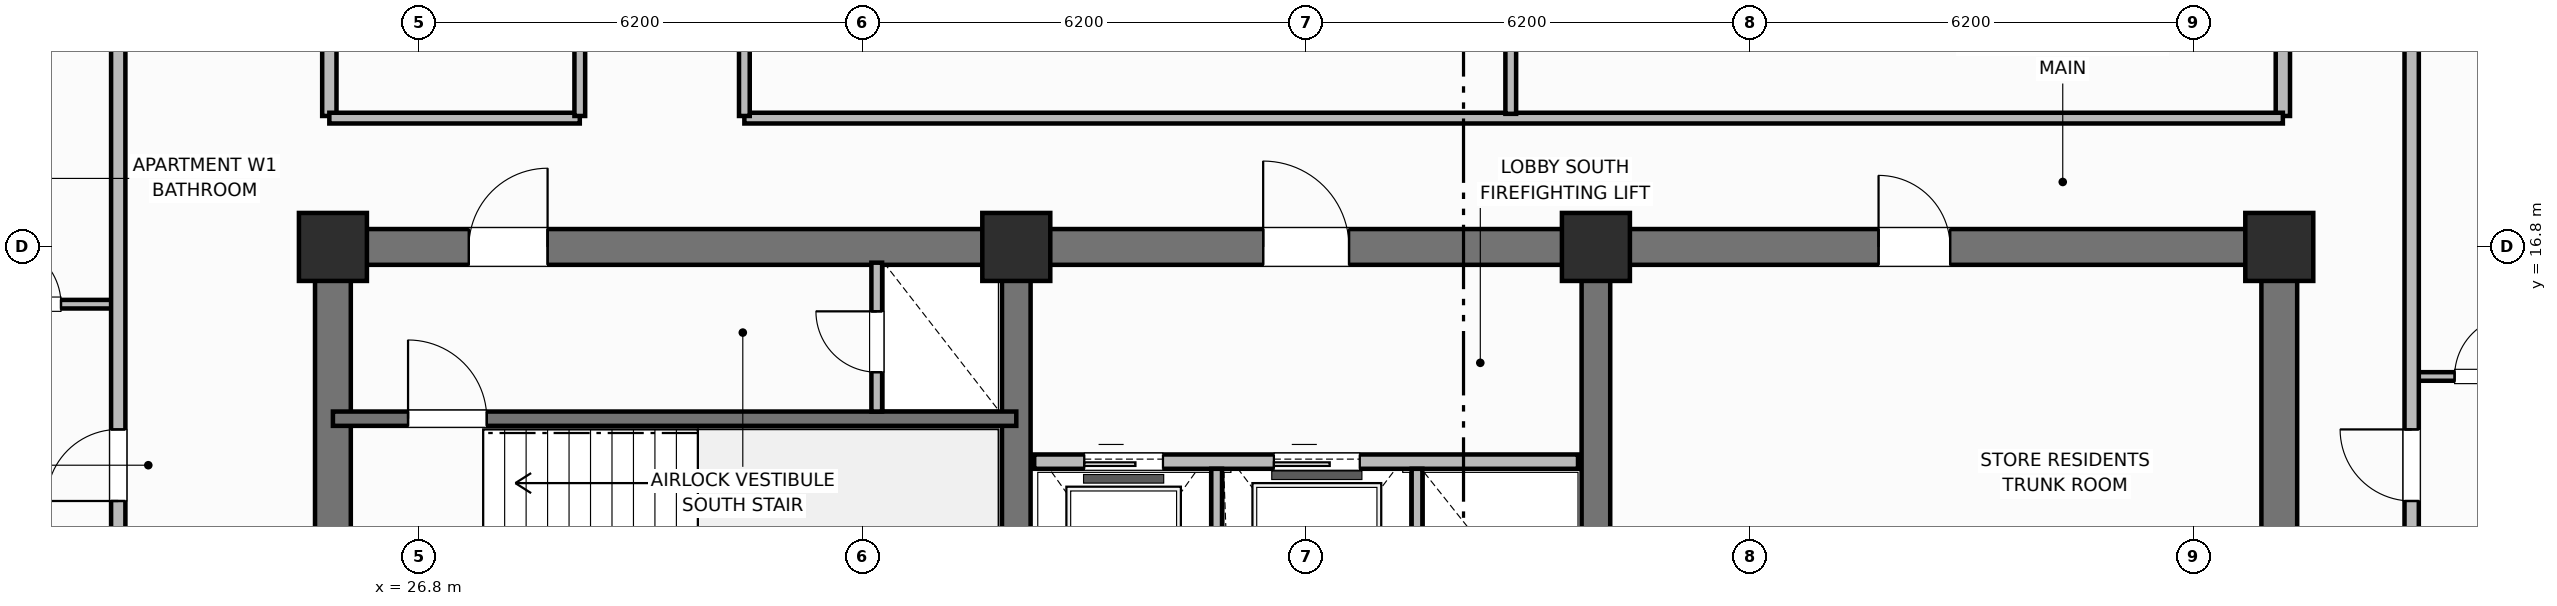
"""IFC4 building model, lengths in metres.
Left out: names, types, materials, properties, quantities, classifications, styles, units other than length and angle.
Written with IfcOpenShell. Run it as: python <this file> out.ifc"""

import sys

from ifc_helpers import new_model, si_unit, direction, frame, frame_2d, origin, origin_2d, place, context, subcontext, project, spatial, rectangle, extrude, element, fill, save


model = new_model("IFC4")
c1 = context("Model", 3, precision=1e-05, world=origin(), true_north=direction((0.0, 1.0)))
c2 = subcontext(c1, "Body", "Model", "MODEL_VIEW")
j1 = project(units=[si_unit("LENGTHUNIT", "METRE"), si_unit("PLANEANGLEUNIT", "RADIAN")], contexts=[c1])
p1 = place(None, origin())
s1 = spatial("IfcSite", under=j1, at=p1, CompositionType="ELEMENT")
p2 = place(p1, origin())
s2 = spatial("IfcBuilding", under=s1, at=p2, CompositionType="ELEMENT")
p3 = place(p2, frame((0.0, 0.0, 184.8)))
s3 = spatial("IfcBuildingStorey", under=s2, at=p3, CompositionType="ELEMENT", Elevation=184.8)
for number, where, z_axis, x_axis in (
    (1, (25.6, 10.85, 0.0), (0.0, 0.0, 1.0), (0.0, 1.0, 0.0)),
    (2, (52.8, 10.85, 0.0), (0.0, 0.0, 1.0), (0.0, 1.0, 0.0)),
):
    element("IfcWall", number, at=place(p3, frame(where, z_axis=z_axis, x_axis=x_axis)), inside=s3, PredefinedType="SHEAR", context=c2, shape_type="SweptSolid", body=[
        extrude(rectangle(XDim=5.7, YDim=0.5, at=frame_2d((2.85, 0.0))), origin(), (0.0, 0.0, 1.0), 3.7),
    ])
p4 = place(p3, frame((25.6, 16.8, 0.0), z_axis=(0.0, 0.0, 1.0), x_axis=(1.0, 0.0, 0.0)))
e3 = element("IfcWall", 3, at=p4, inside=s3, PredefinedType="SHEAR", context=c2, shape_type="SweptSolid", body=[
    extrude(rectangle(XDim=27.2, YDim=0.5, at=frame_2d((13.6, 0.0))), origin(), (0.0, 0.0, 1.0), 3.7),
])
p5 = place(p4, frame((1.9, 0.0, 0.0)))
e4 = element("IfcOpeningElement", 4, at=p5, cuts=e3, PredefinedType="OPENING", context=c2, shape_type="SweptSolid", body=[
    extrude(rectangle(XDim=1.1, YDim=2.15, at=frame_2d((0.55, 1.075))), frame((0.0, 0.26, 0.0), z_axis=(0.0, -1.0, 0.0), x_axis=(1.0, 0.0, 0.0)), (0.0, 0.0, 1.0), 0.52),
])
p6 = place(p4, frame((13.0, 0.0, 0.0)))
e5 = element("IfcOpeningElement", 5, at=p6, cuts=e3, PredefinedType="OPENING", context=c2, shape_type="SweptSolid", body=[
    extrude(rectangle(XDim=1.2, YDim=2.15, at=frame_2d((0.6, 1.075))), frame((0.0, 0.26, 0.0), z_axis=(0.0, -1.0, 0.0), x_axis=(1.0, 0.0, 0.0)), (0.0, 0.0, 1.0), 0.52),
])
p7 = place(p4, frame((21.6, 0.0, 0.0)))
e6 = element("IfcOpeningElement", 6, at=p7, cuts=e3, PredefinedType="OPENING", context=c2, shape_type="SweptSolid", body=[
    extrude(rectangle(XDim=1.0, YDim=2.15, at=frame_2d((0.5, 1.075))), frame((0.0, 0.26, 0.0), z_axis=(0.0, -1.0, 0.0), x_axis=(1.0, 0.0, 0.0)), (0.0, 0.0, 1.0), 0.52),
])
for number, where, z_axis, x_axis in (
    (7, (35.15, 10.85, 0.0), (0.0, 0.0, 1.0), (0.0, 1.0, 0.0)),
    (8, (43.25, 10.85, 0.0), (0.0, 0.0, 1.0), (0.0, 1.0, 0.0)),
):
    element("IfcWall", number, at=place(p3, frame(where, z_axis=z_axis, x_axis=x_axis)), inside=s3, PredefinedType="SHEAR", context=c2, shape_type="SweptSolid", body=[
        extrude(rectangle(XDim=5.7, YDim=0.4, at=frame_2d((2.85, 0.0))), origin(), (0.0, 0.0, 1.0), 3.7),
    ])
for number, where, z_axis, x_axis in (
    (9, (25.6, 16.8, 0.0), (0.0, 0.0, 1.0), (1.0, 0.0, 0.0)),
    (10, (35.15, 16.8, 0.0), (0.0, 0.0, 1.0), (1.0, 0.0, 0.0)),
    (11, (43.25, 16.8, 0.0), (0.0, 0.0, 1.0), (1.0, 0.0, 0.0)),
    (12, (52.8, 16.8, 0.0), (0.0, 0.0, 1.0), (1.0, 0.0, 0.0)),
):
    element("IfcColumn", number, at=place(p3, frame(where, z_axis=z_axis, x_axis=x_axis)), inside=s3, PredefinedType="COLUMN", context=c2, shape_type="SweptSolid", body=[
        extrude(rectangle(XDim=0.95, YDim=0.95, at=origin_2d()), origin(), (0.0, 0.0, 1.0), 3.7),
    ])
p8 = place(p3, frame((25.6, 14.4, 0.0), z_axis=(0.0, 0.0, 1.0), x_axis=(1.0, 0.0, 0.0)))
e13 = element("IfcWall", 13, at=p8, inside=s3, PredefinedType="SHEAR", context=c2, shape_type="SweptSolid", body=[
    extrude(rectangle(XDim=9.55, YDim=0.2, at=frame_2d((4.775, 0.0))), origin(), (0.0, 0.0, 1.0), 3.7),
])
p9 = place(p8, frame((1.05, 0.0, 0.0)))
e14 = element("IfcOpeningElement", 14, at=p9, cuts=e13, PredefinedType="OPENING", context=c2, shape_type="SweptSolid", body=[
    extrude(rectangle(XDim=1.1, YDim=2.15, at=frame_2d((0.55, 1.075))), frame((0.0, 0.11, 0.0), z_axis=(0.0, -1.0, 0.0), x_axis=(1.0, 0.0, 0.0)), (0.0, 0.0, 1.0), 0.22),
])
p10 = place(p3, frame((33.2, 14.5, 0.0), z_axis=(0.0, 0.0, 1.0), x_axis=(0.0, 1.0, 0.0)))
e15 = element("IfcWall", 15, at=p10, inside=s3, PredefinedType="PARTITIONING", context=c2, shape_type="SweptSolid", body=[
    extrude(rectangle(XDim=2.08, YDim=0.15, at=frame_2d((1.04, 0.0))), origin(), (0.0, 0.0, 1.0), 2.55),
])
p11 = place(p10, frame((0.55, 0.0, 0.0)))
e16 = element("IfcOpeningElement", 16, at=p11, cuts=e15, PredefinedType="OPENING", context=c2, shape_type="SweptSolid", body=[
    extrude(rectangle(XDim=0.85, YDim=2.05, at=frame_2d((0.425, 1.025))), frame((0.0, 0.085, 0.0), z_axis=(0.0, -1.0, 0.0), x_axis=(1.0, 0.0, 0.0)), (0.0, 0.0, 1.0), 0.17),
])
p12 = place(p3, frame((35.4, 13.8, 0.0), z_axis=(0.0, 0.0, 1.0), x_axis=(1.0, 0.0, 0.0)))
e17 = element("IfcWall", 17, at=p12, inside=s3, PredefinedType="PARTITIONING", context=c2, shape_type="SweptSolid", body=[
    extrude(rectangle(XDim=7.6, YDim=0.2, at=frame_2d((3.8, 0.0))), origin(), (0.0, 0.0, 1.0), 2.32),
])
p13 = place(p12, frame((0.7, 0.0, 0.0)))
e18 = element("IfcOpeningElement", 18, at=p13, cuts=e17, PredefinedType="OPENING", context=c2, shape_type="SweptSolid", body=[
    extrude(rectangle(XDim=1.1, YDim=2.15, at=frame_2d((0.55, 1.075))), frame((0.0, 0.11, 0.0), z_axis=(0.0, -1.0, 0.0), x_axis=(1.0, 0.0, 0.0)), (0.0, 0.0, 1.0), 0.22),
])
p14 = place(p12, frame((3.35, 0.0, 0.0)))
e19 = element("IfcOpeningElement", 19, at=p14, cuts=e17, PredefinedType="OPENING", context=c2, shape_type="SweptSolid", body=[
    extrude(rectangle(XDim=1.2, YDim=2.15, at=frame_2d((0.6, 1.075))), frame((0.0, 0.11, 0.0), z_axis=(0.0, -1.0, 0.0), x_axis=(1.0, 0.0, 0.0)), (0.0, 0.0, 1.0), 0.22),
])
for number, where, z_axis, x_axis in (
    (20, (37.95, 10.95, 0.0), (0.0, 0.0, 1.0), (0.0, 1.0, 0.0)),
    (21, (40.75, 10.95, 0.0), (0.0, 0.0, 1.0), (0.0, 1.0, 0.0)),
):
    element("IfcWall", number, at=place(p3, frame(where, z_axis=z_axis, x_axis=x_axis)), inside=s3, PredefinedType="PARTITIONING", context=c2, shape_type="SweptSolid", body=[
        extrude(rectangle(XDim=2.75, YDim=0.15, at=frame_2d((1.375, 0.0))), origin(), (0.0, 0.0, 1.0), 2.55),
    ])
for number, where, z_axis, x_axis in (
    (22, (25.55, 18.63, 0.0), (0.0, 0.0, 1.0), (0.0, 1.0, 0.0)),
    (23, (52.85, 18.63, 0.0), (0.0, 0.0, 1.0), (0.0, 1.0, 0.0)),
):
    element("IfcWall", number, at=place(p3, frame(where, z_axis=z_axis, x_axis=x_axis)), inside=s3, PredefinedType="PARTITIONING", context=c2, shape_type="SweptSolid", body=[
        extrude(rectangle(XDim=19.14, YDim=0.2, at=frame_2d((9.57, 0.0))), origin(), (0.0, 0.0, 1.0), 2.55),
    ])
p15 = place(p3, frame((25.55, 18.6, 0.0), z_axis=(0.0, 0.0, 1.0), x_axis=(1.0, 0.0, 0.0)))
e24 = element("IfcWall", 24, at=p15, inside=s3, PredefinedType="PARTITIONING", context=c2, shape_type="SweptSolid", body=[
    extrude(rectangle(XDim=3.5, YDim=0.15, at=frame_2d((1.75, 0.0))), origin(), (0.0, 0.0, 1.0), 2.55),
])
p16 = place(p3, frame((31.35, 18.6, 0.0), z_axis=(0.0, 0.0, 1.0), x_axis=(1.0, 0.0, 0.0)))
e25 = element("IfcWall", 25, at=p16, inside=s3, PredefinedType="PARTITIONING", context=c2, shape_type="SweptSolid", body=[
    extrude(rectangle(XDim=21.5, YDim=0.15, at=frame_2d((10.75, 0.0))), origin(), (0.0, 0.0, 1.0), 2.55),
])
p17 = place(p3, frame((42.06, 18.66, 0.0), z_axis=(0.0, 0.0, 1.0), x_axis=(0.0, 1.0, 0.0)))
e26 = element("IfcWall", 26, at=p17, inside=s3, PredefinedType="PARTITIONING", context=c2, shape_type="SweptSolid", body=[
    extrude(rectangle(XDim=19.08, YDim=0.15, at=frame_2d((9.54, 0.0))), origin(), (0.0, 0.0, 1.0), 2.55),
])
p18 = place(p17, frame((6.5, 0.0, 0.0)))
e27 = element("IfcOpeningElement", 27, at=p18, cuts=e26, PredefinedType="OPENING", context=c2, shape_type="SweptSolid", body=[
    extrude(rectangle(XDim=1.0, YDim=2.15, at=frame_2d((0.5, 1.075))), frame((0.0, 0.085, 0.0), z_axis=(0.0, -1.0, 0.0), x_axis=(1.0, 0.0, 0.0)), (0.0, 0.0, 1.0), 0.17),
])
p19 = place(p3, frame((29.05, 18.63, 0.0), z_axis=(0.0, 0.0, 1.0), x_axis=(0.0, 1.0, 0.0)))
e28 = element("IfcWall", 28, at=p19, inside=s3, PredefinedType="PARTITIONING", context=c2, shape_type="SweptSolid", body=[
    extrude(rectangle(XDim=19.14, YDim=0.15, at=frame_2d((9.57, 0.0))), origin(), (0.0, 0.0, 1.0), 2.55),
])
p20 = place(p19, frame((5.5, 0.0, 0.0)))
e29 = element("IfcOpeningElement", 29, at=p20, cuts=e28, PredefinedType="OPENING", context=c2, shape_type="SweptSolid", body=[
    extrude(rectangle(XDim=1.0, YDim=2.15, at=frame_2d((0.5, 1.075))), frame((0.0, 0.085, 0.0), z_axis=(0.0, -1.0, 0.0), x_axis=(1.0, 0.0, 0.0)), (0.0, 0.0, 1.0), 0.17),
])
p21 = place(p3, frame((31.35, 18.63, 0.0), z_axis=(0.0, 0.0, 1.0), x_axis=(0.0, 1.0, 0.0)))
e30 = element("IfcWall", 30, at=p21, inside=s3, PredefinedType="PARTITIONING", context=c2, shape_type="SweptSolid", body=[
    extrude(rectangle(XDim=19.14, YDim=0.15, at=frame_2d((9.57, 0.0))), origin(), (0.0, 0.0, 1.0), 2.55),
])
p22 = place(p21, frame((5.5, 0.0, 0.0)))
e31 = element("IfcOpeningElement", 31, at=p22, cuts=e30, PredefinedType="OPENING", context=c2, shape_type="SweptSolid", body=[
    extrude(rectangle(XDim=1.0, YDim=2.15, at=frame_2d((0.5, 1.075))), frame((0.0, 0.085, 0.0), z_axis=(0.0, -1.0, 0.0), x_axis=(1.0, 0.0, 0.0)), (0.0, 0.0, 1.0), 0.17),
])
p23 = place(p3, frame((20.35, 16.0, 0.0), z_axis=(0.0, 0.0, 1.0), x_axis=(1.0, 0.0, 0.0)))
e32 = element("IfcWall", 32, at=p23, inside=s3, PredefinedType="PARTITIONING", context=c2, shape_type="SweptSolid", body=[
    extrude(rectangle(XDim=2.25, YDim=0.12, at=frame_2d((1.125, 0.0))), origin(), (0.0, 0.0, 1.0), 2.55),
])
p24 = place(p23, frame((0.6, 0.0, 0.0)))
e33 = element("IfcOpeningElement", 33, at=p24, cuts=e32, PredefinedType="OPENING", context=c2, shape_type="SweptSolid", body=[
    extrude(rectangle(XDim=0.85, YDim=2.1, at=frame_2d((0.425, 1.05))), frame((0.0, 0.07, 0.0), z_axis=(0.0, -1.0, 0.0), x_axis=(1.0, 0.0, 0.0)), (0.0, 0.0, 1.0), 0.14),
])
p25 = place(p3, frame((22.6, 10.6, 0.0), z_axis=(0.0, 0.0, 1.0), x_axis=(0.0, 1.0, 0.0)))
e34 = element("IfcWall", 34, at=p25, inside=s3, PredefinedType="PARTITIONING", context=c2, shape_type="SweptSolid", body=[
    extrude(rectangle(XDim=35.2, YDim=0.2, at=frame_2d((17.6, 0.0))), origin(), (0.0, 0.0, 1.0), 2.55),
])
p26 = place(p25, frame((2.65, 0.0, 0.0)))
e35 = element("IfcOpeningElement", 35, at=p26, cuts=e34, PredefinedType="OPENING", context=c2, shape_type="SweptSolid", body=[
    extrude(rectangle(XDim=1.0, YDim=2.15, at=frame_2d((0.5, 1.075))), frame((0.0, 0.11, 0.0), z_axis=(0.0, -1.0, 0.0), x_axis=(1.0, 0.0, 0.0)), (0.0, 0.0, 1.0), 0.22),
])
p27 = place(p25, frame((22.75, 0.0, 0.0)))
e36 = element("IfcOpeningElement", 36, at=p27, cuts=e34, PredefinedType="OPENING", context=c2, shape_type="SweptSolid", body=[
    extrude(rectangle(XDim=1.0, YDim=2.15, at=frame_2d((0.5, 1.075))), frame((0.0, 0.11, 0.0), z_axis=(0.0, -1.0, 0.0), x_axis=(1.0, 0.0, 0.0)), (0.0, 0.0, 1.0), 0.22),
])
p28 = place(p3, frame((54.65, 14.99, 0.0), z_axis=(0.0, 0.0, 1.0), x_axis=(1.0, 0.0, 0.0)))
e37 = element("IfcWall", 37, at=p28, inside=s3, PredefinedType="PARTITIONING", context=c2, shape_type="SweptSolid", body=[
    extrude(rectangle(XDim=2.25, YDim=0.12, at=frame_2d((1.125, 0.0))), origin(), (0.0, 0.0, 1.0), 2.55),
])
p29 = place(p28, frame((0.6, 0.0, 0.0)))
e38 = element("IfcOpeningElement", 38, at=p29, cuts=e37, PredefinedType="OPENING", context=c2, shape_type="SweptSolid", body=[
    extrude(rectangle(XDim=0.85, YDim=2.1, at=frame_2d((0.425, 1.05))), frame((0.0, 0.07, 0.0), z_axis=(0.0, -1.0, 0.0), x_axis=(1.0, 0.0, 0.0)), (0.0, 0.0, 1.0), 0.14),
])
p30 = place(p3, frame((54.65, 10.6, 0.0), z_axis=(0.0, 0.0, 1.0), x_axis=(0.0, 1.0, 0.0)))
e39 = element("IfcWall", 39, at=p30, inside=s3, PredefinedType="PARTITIONING", context=c2, shape_type="SweptSolid", body=[
    extrude(rectangle(XDim=35.2, YDim=0.2, at=frame_2d((17.6, 0.0))), origin(), (0.0, 0.0, 1.0), 2.55),
])
p31 = place(p30, frame((2.65, 0.0, 0.0)))
e40 = element("IfcOpeningElement", 40, at=p31, cuts=e39, PredefinedType="OPENING", context=c2, shape_type="SweptSolid", body=[
    extrude(rectangle(XDim=1.0, YDim=2.15, at=frame_2d((0.5, 1.075))), frame((0.0, 0.11, 0.0), z_axis=(0.0, -1.0, 0.0), x_axis=(1.0, 0.0, 0.0)), (0.0, 0.0, 1.0), 0.22),
])
p32 = place(p30, frame((11.352, 0.0, 0.0)))
e41 = element("IfcOpeningElement", 41, at=p32, cuts=e39, PredefinedType="OPENING", context=c2, shape_type="SweptSolid", body=[
    extrude(rectangle(XDim=1.0, YDim=2.15, at=frame_2d((0.5, 1.075))), frame((0.0, 0.11, 0.0), z_axis=(0.0, -1.0, 0.0), x_axis=(1.0, 0.0, 0.0)), (0.0, 0.0, 1.0), 0.22),
])
p33 = place(p30, frame((21.37, 0.0, 0.0)))
e42 = element("IfcOpeningElement", 42, at=p33, cuts=e39, PredefinedType="OPENING", context=c2, shape_type="SweptSolid", body=[
    extrude(rectangle(XDim=1.0, YDim=2.15, at=frame_2d((0.5, 1.075))), frame((0.0, 0.11, 0.0), z_axis=(0.0, -1.0, 0.0), x_axis=(1.0, 0.0, 0.0)), (0.0, 0.0, 1.0), 0.22),
])
p34 = place(p30, frame((27.302, 0.0, 0.0)))
e43 = element("IfcOpeningElement", 43, at=p34, cuts=e39, PredefinedType="OPENING", context=c2, shape_type="SweptSolid", body=[
    extrude(rectangle(XDim=1.0, YDim=2.15, at=frame_2d((0.5, 1.075))), frame((0.0, 0.11, 0.0), z_axis=(0.0, -1.0, 0.0), x_axis=(1.0, 0.0, 0.0)), (0.0, 0.0, 1.0), 0.22),
])
p35 = place(p9, origin())
e44 = element("IfcDoor", 44, at=p35, inside=s3, OperationType="SINGLE_SWING_LEFT", PredefinedType="DOOR", context=c2, shape_type="SweptSolid", body=[
    extrude(rectangle(XDim=1.1, YDim=2.15, at=frame_2d((0.55, 1.075))), frame((0.0, 0.025, 0.0), z_axis=(0.0, -1.0, 0.0), x_axis=(1.0, 0.0, 0.0)), (0.0, 0.0, 1.0), 0.05),
])
fill(e14, e44)
p36 = place(p11, origin())
e45 = element("IfcDoor", 45, at=p36, inside=s3, OperationType="SINGLE_SWING_RIGHT", PredefinedType="TRAPDOOR", context=c2, shape_type="SweptSolid", body=[
    extrude(rectangle(XDim=0.85, YDim=2.05, at=frame_2d((0.425, 1.025))), frame((0.0, 0.025, 0.0), z_axis=(0.0, -1.0, 0.0), x_axis=(1.0, 0.0, 0.0)), (0.0, 0.0, 1.0), 0.05),
])
fill(e16, e45)
p37 = place(p13, origin())
e46 = element("IfcDoor", 46, at=p37, inside=s3, OperationType="SLIDING_TO_LEFT", PredefinedType="DOOR", context=c2, shape_type="SweptSolid", body=[
    extrude(rectangle(XDim=1.1, YDim=2.15, at=frame_2d((0.55, 1.075))), frame((0.0, 0.025, 0.0), z_axis=(0.0, -1.0, 0.0), x_axis=(1.0, 0.0, 0.0)), (0.0, 0.0, 1.0), 0.05),
])
fill(e18, e46)
p38 = place(p14, origin())
e47 = element("IfcDoor", 47, at=p38, inside=s3, OperationType="SLIDING_TO_LEFT", PredefinedType="DOOR", context=c2, shape_type="SweptSolid", body=[
    extrude(rectangle(XDim=1.2, YDim=2.15, at=frame_2d((0.6, 1.075))), frame((0.0, 0.025, 0.0), z_axis=(0.0, -1.0, 0.0), x_axis=(1.0, 0.0, 0.0)), (0.0, 0.0, 1.0), 0.05),
])
fill(e19, e47)
p39 = place(p24, origin())
e48 = element("IfcDoor", 48, at=p39, inside=s3, OperationType="SINGLE_SWING_LEFT", PredefinedType="DOOR", context=c2, shape_type="SweptSolid", body=[
    extrude(rectangle(XDim=0.85, YDim=2.1, at=frame_2d((0.425, 1.05))), frame((0.0, 0.025, 0.0), z_axis=(0.0, -1.0, 0.0), x_axis=(1.0, 0.0, 0.0)), (0.0, 0.0, 1.0), 0.05),
])
fill(e33, e48)
p40 = place(p26, origin())
e49 = element("IfcDoor", 49, at=p40, inside=s3, OperationType="SINGLE_SWING_LEFT", PredefinedType="DOOR", context=c2, shape_type="SweptSolid", body=[
    extrude(rectangle(XDim=1.0, YDim=2.15, at=frame_2d((0.5, 1.075))), frame((0.0, 0.025, 0.0), z_axis=(0.0, -1.0, 0.0), x_axis=(1.0, 0.0, 0.0)), (0.0, 0.0, 1.0), 0.05),
])
fill(e35, e49)
p41 = place(p29, origin())
e50 = element("IfcDoor", 50, at=p41, inside=s3, OperationType="SINGLE_SWING_RIGHT", PredefinedType="DOOR", context=c2, shape_type="SweptSolid", body=[
    extrude(rectangle(XDim=0.85, YDim=2.1, at=frame_2d((0.425, 1.05))), frame((0.0, 0.025, 0.0), z_axis=(0.0, -1.0, 0.0), x_axis=(1.0, 0.0, 0.0)), (0.0, 0.0, 1.0), 0.05),
])
fill(e38, e50)
p42 = place(p31, origin())
e51 = element("IfcDoor", 51, at=p42, inside=s3, OperationType="SINGLE_SWING_RIGHT", PredefinedType="DOOR", context=c2, shape_type="SweptSolid", body=[
    extrude(rectangle(XDim=1.0, YDim=2.15, at=frame_2d((0.5, 1.075))), frame((0.0, 0.025, 0.0), z_axis=(0.0, -1.0, 0.0), x_axis=(1.0, 0.0, 0.0)), (0.0, 0.0, 1.0), 0.05),
])
fill(e40, e51)
p43 = place(p5, origin())
e52 = element("IfcDoor", 52, at=p43, inside=s3, OperationType="SINGLE_SWING_RIGHT", PredefinedType="DOOR", context=c2, shape_type="SweptSolid", body=[
    extrude(rectangle(XDim=1.1, YDim=2.15, at=frame_2d((0.55, 1.075))), frame((0.0, 0.025, 0.0), z_axis=(0.0, -1.0, 0.0), x_axis=(1.0, 0.0, 0.0)), (0.0, 0.0, 1.0), 0.05),
])
fill(e4, e52)
p44 = place(p6, origin())
e53 = element("IfcDoor", 53, at=p44, inside=s3, OperationType="SINGLE_SWING_LEFT", PredefinedType="DOOR", context=c2, shape_type="SweptSolid", body=[
    extrude(rectangle(XDim=1.2, YDim=2.15, at=frame_2d((0.6, 1.075))), frame((0.0, 0.025, 0.0), z_axis=(0.0, -1.0, 0.0), x_axis=(1.0, 0.0, 0.0)), (0.0, 0.0, 1.0), 0.05),
])
fill(e5, e53)
p45 = place(p7, origin())
e54 = element("IfcDoor", 54, at=p45, inside=s3, OperationType="SINGLE_SWING_LEFT", PredefinedType="DOOR", context=c2, shape_type="SweptSolid", body=[
    extrude(rectangle(XDim=1.0, YDim=2.15, at=frame_2d((0.5, 1.075))), frame((0.0, 0.025, 0.0), z_axis=(0.0, -1.0, 0.0), x_axis=(1.0, 0.0, 0.0)), (0.0, 0.0, 1.0), 0.05),
])
fill(e6, e54)
save(model, sys.argv[1])
